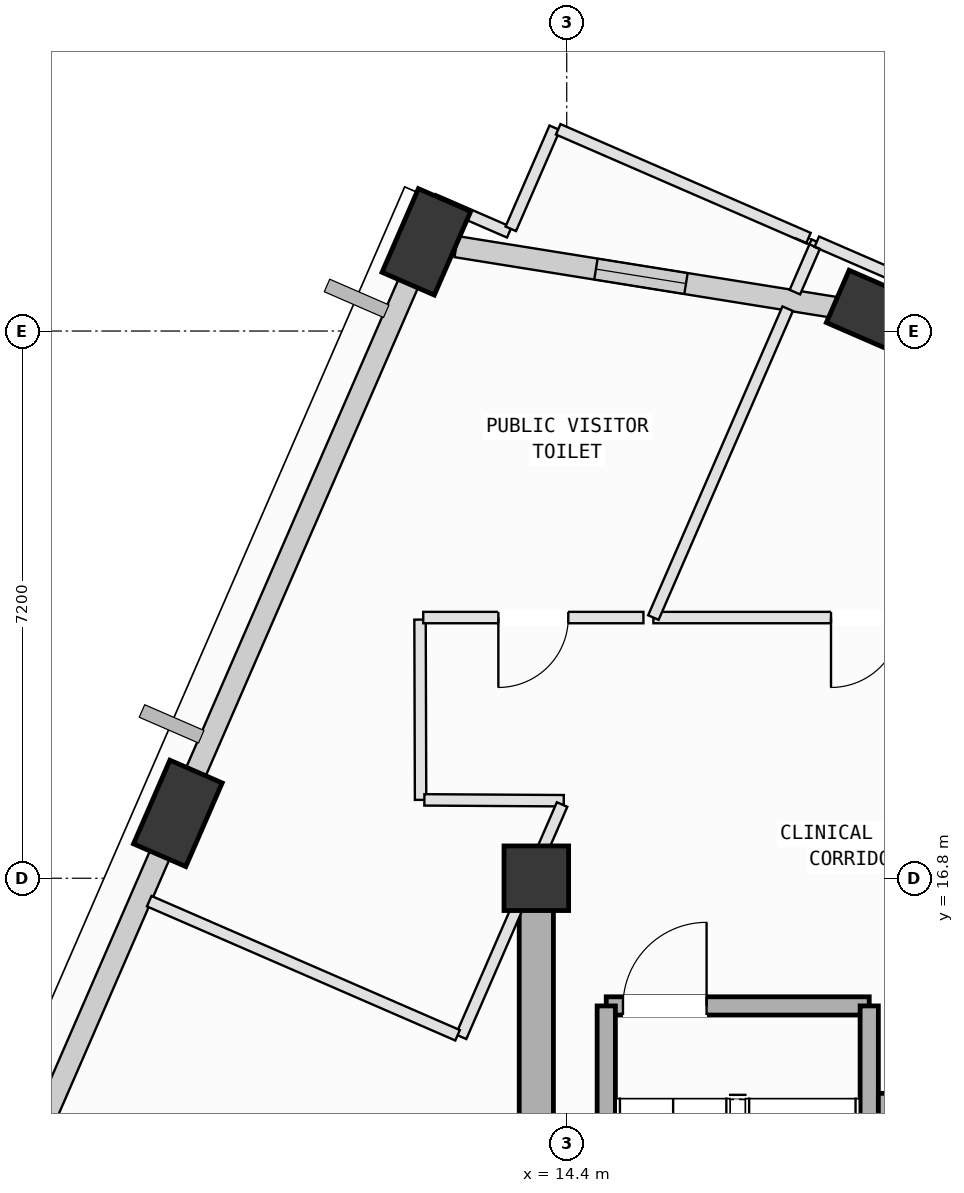
"""IFC4 building model, lengths in metres.
Left out: names, types, materials, properties, quantities, classifications, styles, units other than length and angle.
Written with IfcOpenShell. Run it as: python <this file> out.ifc"""

import sys

from ifc_helpers import new_model, si_unit, direction, frame, frame_2d, origin, origin_2d, place, context, subcontext, project, spatial, rectangle, extrude, element, fill, save


model = new_model("IFC4")
c1 = context("Model", 3, precision=1e-05, world=origin(), true_north=direction((0.0, 1.0)))
c2 = subcontext(c1, "Body", "Model", "MODEL_VIEW")
j1 = project(units=[si_unit("LENGTHUNIT", "METRE"), si_unit("PLANEANGLEUNIT", "RADIAN")], contexts=[c1])
p1 = place(None, origin())
s1 = spatial("IfcSite", under=j1, at=p1, CompositionType="ELEMENT")
p2 = place(p1, origin())
s2 = spatial("IfcBuilding", under=s1, at=p2, CompositionType="ELEMENT")
p3 = place(p2, frame((0.0, 0.0, 320.6)))
s3 = spatial("IfcBuildingStorey", under=s2, at=p3, CompositionType="ELEMENT", Elevation=320.6)
p4 = place(p3, frame((14.0, 16.8, 0.0), z_axis=(0.0, 0.0, 1.0), x_axis=(1.0, 0.0, 0.0)))
e1 = element("IfcColumn", 1, at=p4, inside=s3, PredefinedType="COLUMN", context=c2, shape_type="SweptSolid", body=[
    extrude(rectangle(XDim=0.85, YDim=0.85, at=origin_2d()), origin(), (0.0, 0.0, 1.0), 4.0),
])
for number, where, z_axis, x_axis in (
    (2, (18.516, 24.216, 0.002), (0.0, 0.0, 1.0), (-0.917, 0.399, 0.0)),
    (3, (12.553, 25.173, 0.002), (0.0, 0.0, 1.0), (0.399, 0.917, 0.0)),
    (4, (9.283, 17.654, 0.002), (0.0, 0.0, 1.0), (0.399, 0.917, 0.0)),
):
    element("IfcColumn", number, at=place(p3, frame(where, z_axis=z_axis, x_axis=x_axis)), inside=s3, PredefinedType="COLUMN", context=c2, shape_type="SweptSolid", body=[
        extrude(rectangle(XDim=1.2, YDim=0.75, at=origin_2d()), origin(), (0.0, 0.0, 1.0), 3.996),
    ])
p5 = place(p3, frame((12.946, 25.11, 0.0), z_axis=(0.0, 0.0, 1.0), x_axis=(0.987363821305, -0.158469821666, 0.0)))
e5 = element("IfcWall", 5, at=p5, inside=s3, PredefinedType="SOLIDWALL", context=c2, shape_type="SweptSolid", body=[
    extrude(rectangle(XDim=5.244, YDim=0.28, at=frame_2d((2.622, 0.0))), origin(), (0.0, 0.0, 1.0), 3.265),
])
p6 = place(p5, frame((1.862, 0.0, 0.75)))
e6 = element("IfcOpeningElement", 6, at=p6, cuts=e5, PredefinedType="OPENING", context=c2, shape_type="SweptSolid", body=[
    extrude(rectangle(XDim=1.2, YDim=1.75, at=frame_2d((0.6, 0.875))), frame((0.0, 0.15, 0.0), z_axis=(0.0, -1.0, 0.0), x_axis=(1.0, 0.0, 0.0)), (0.0, 0.0, 1.0), 0.3),
])
p7 = place(p3, frame((9.442, 18.018, 0.0), z_axis=(0.0, 0.0, 1.0), x_axis=(0.398768305896, 0.917051709672, 0.0)))
e7 = element("IfcWall", 7, at=p7, inside=s3, PredefinedType="SOLIDWALL", context=c2, shape_type="SweptSolid", body=[
    extrude(rectangle(XDim=7.405, YDim=0.28, at=frame_2d((3.703, 0.0))), origin(), (0.0, 0.0, 1.0), 3.265),
])
p8 = place(p3, frame((6.172, 10.498, 0.0), z_axis=(0.0, 0.0, 1.0), x_axis=(0.398740578379, 0.917063766133, 0.0)))
e8 = element("IfcWall", 8, at=p8, inside=s3, PredefinedType="SOLIDWALL", context=c2, shape_type="SweptSolid", body=[
    extrude(rectangle(XDim=7.405, YDim=0.28, at=frame_2d((3.702, 0.0))), origin(), (0.0, 0.0, 1.0), 3.265),
])
p9 = place(p3, frame((14.92, 15.12, 0.0), z_axis=(0.0, 0.0, 1.0), x_axis=(1.0, 0.0, 0.0)))
e9 = element("IfcWall", 9, at=p9, inside=s3, PredefinedType="SOLIDWALL", context=c2, shape_type="SweptSolid", body=[
    extrude(rectangle(XDim=3.46, YDim=0.24, at=frame_2d((1.73, 0.0))), origin(), (0.0, 0.0, 1.0), 3.78),
])
p10 = place(p9, frame((0.22, 0.0, 0.0)))
e10 = element("IfcOpeningElement", 10, at=p10, cuts=e9, PredefinedType="OPENING", context=c2, shape_type="SweptSolid", body=[
    extrude(rectangle(XDim=1.1, YDim=2.15, at=frame_2d((0.55, 1.075))), frame((0.0, 0.13, 0.0), z_axis=(0.0, -1.0, 0.0), x_axis=(1.0, 0.0, 0.0)), (0.0, 0.0, 1.0), 0.26),
])
for number, where, z_axis, x_axis in (
    (11, (18.38, 15.12, 0.0), (0.0, 0.0, 1.0), (0.0, -1.0, 0.0)),
    (12, (14.92, 8.025, 0.0), (0.0, 0.0, 1.0), (0.0, 1.0, 0.0)),
):
    element("IfcWall", number, at=place(p3, frame(where, z_axis=z_axis, x_axis=x_axis)), inside=s3, PredefinedType="SOLIDWALL", context=c2, shape_type="SweptSolid", body=[
        extrude(rectangle(XDim=7.095, YDim=0.24, at=frame_2d((3.548, 0.0))), origin(), (0.0, 0.0, 1.0), 3.78),
    ])
p11 = place(p3, frame((14.0, 16.8, 0.0), z_axis=(0.0, 0.0, 1.0), x_axis=(0.0, -1.0, 0.0)))
e13 = element("IfcWall", 13, at=p11, inside=s3, PredefinedType="SHEAR", context=c2, shape_type="SweptSolid", body=[
    extrude(rectangle(XDim=9.0, YDim=0.45, at=frame_2d((4.5, 0.0))), origin(), (0.0, 0.0, 1.0), 3.78),
])
p12 = place(p3, frame((18.5, 13.82, 0.0), z_axis=(0.0, 0.0, 1.0), x_axis=(1.0, 0.0, 0.0)))
e14 = element("IfcWall", 14, at=p12, inside=s3, PredefinedType="SOLIDWALL", context=c2, shape_type="SweptSolid", body=[
    extrude(rectangle(XDim=5.3, YDim=0.3, at=frame_2d((2.65, 0.0))), origin(), (0.0, 0.0, 1.0), 3.78),
])
p13 = place(p12, frame((0.18, 0.0, 0.0)))
e15 = element("IfcOpeningElement", 15, at=p13, cuts=e14, PredefinedType="OPENING", context=c2, shape_type="SweptSolid", body=[
    extrude(rectangle(XDim=1.1, YDim=2.15, at=frame_2d((0.55, 1.075))), frame((0.0, 0.16, 0.0), z_axis=(0.0, -1.0, 0.0), x_axis=(1.0, 0.0, 0.0)), (0.0, 0.0, 1.0), 0.32),
])
p14 = place(p3, frame((21.134, 20.23, 0.0), z_axis=(0.0, 0.0, 1.0), x_axis=(-1.0, 0.0, 0.0)))
e16 = element("IfcWall", 16, at=p14, inside=s3, PredefinedType="PARTITIONING", context=c2, shape_type="SweptSolid", body=[
    extrude(rectangle(XDim=5.594, YDim=0.15, at=frame_2d((2.797, 0.0))), origin(), (0.0, 0.0, 1.0), 3.415),
])
p15 = place(p14, frame((2.337, 0.0, 0.0)))
e17 = element("IfcOpeningElement", 17, at=p15, cuts=e16, PredefinedType="OPENING", context=c2, shape_type="SweptSolid", body=[
    extrude(rectangle(XDim=0.92, YDim=2.1, at=frame_2d((0.46, 1.05))), frame((0.0, 0.085, 0.0), z_axis=(0.0, -1.0, 0.0), x_axis=(1.0, 0.0, 0.0)), (0.0, 0.0, 1.0), 0.17),
])
p16 = place(p3, frame((15.54, 20.23, 0.0), z_axis=(0.0, 0.0, 1.0), x_axis=(0.398707980575, 0.917077939014, 0.0)))
e18 = element("IfcWall", 18, at=p16, inside=s3, PredefinedType="PARTITIONING", context=c2, shape_type="SweptSolid", body=[
    extrude(rectangle(XDim=4.431, YDim=0.15, at=frame_2d((2.216, 0.0))), origin(), (0.0, 0.0, 1.0), 2.765),
])
p17 = place(p3, frame((17.402, 24.512, 0.0), z_axis=(0.0, 0.0, 1.0), x_axis=(0.398195004061, 0.917300789677, 0.0)))
e19 = element("IfcWall", 19, at=p17, inside=s3, PredefinedType="PARTITIONING", context=c2, shape_type="SweptSolid", body=[
    extrude(rectangle(XDim=0.723, YDim=0.15, at=frame_2d((0.361, 0.0))), origin(), (0.0, 0.0, 1.0), 3.78),
])
p18 = place(p3, frame((17.69, 25.175, 0.0), z_axis=(0.0, 0.0, 1.0), x_axis=(0.917107123666, -0.398640845525, 0.0)))
e20 = element("IfcWall", 20, at=p18, inside=s3, PredefinedType="PARTITIONING", context=c2, shape_type="SweptSolid", body=[
    extrude(rectangle(XDim=5.13, YDim=0.15, at=frame_2d((2.565, 0.0))), origin(), (0.0, 0.0, 1.0), 3.78),
])
p19 = place(p3, frame((12.47, 20.203, 0.0), z_axis=(0.0, 0.0, 1.0), x_axis=(0.002985061327, -0.999995544695, 0.0)))
e21 = element("IfcWall", 21, at=p19, inside=s3, PredefinedType="PARTITIONING", context=c2, shape_type="SweptSolid", body=[
    extrude(rectangle(XDim=2.372, YDim=0.15, at=frame_2d((1.186, 0.0))), origin(), (0.0, 0.0, 1.0), 3.78),
])
p20 = place(p3, frame((12.527, 17.831, 0.0), z_axis=(0.0, 0.0, 1.0), x_axis=(0.999982057945, -0.005990307855, 0.0)))
e22 = element("IfcWall", 22, at=p20, inside=s3, PredefinedType="PARTITIONING", context=c2, shape_type="SweptSolid", body=[
    extrude(rectangle(XDim=1.834, YDim=0.15, at=frame_2d((0.917, 0.0))), origin(), (0.0, 0.0, 1.0), 3.78),
])
p21 = place(p3, frame((14.339, 17.77, 0.0), z_axis=(0.0, 0.0, 1.0), x_axis=(-0.399140640041, -0.916889714997, 0.0)))
e23 = element("IfcWall", 23, at=p21, inside=s3, PredefinedType="PARTITIONING", context=c2, shape_type="SweptSolid", body=[
    extrude(rectangle(XDim=0.84, YDim=0.15, at=frame_2d((0.42, 0.0))), origin(), (0.0, 0.0, 1.0), 2.765),
])
p22 = place(p3, frame((13.8, 16.53, 0.0), z_axis=(0.0, 0.0, 1.0), x_axis=(-0.398942481852, -0.916975951797, 0.0)))
e24 = element("IfcWall", 24, at=p22, inside=s3, PredefinedType="PARTITIONING", context=c2, shape_type="SweptSolid", body=[
    extrude(rectangle(XDim=1.98, YDim=0.15, at=frame_2d((0.99, 0.0))), origin(), (0.0, 0.0, 1.0), 2.765),
])
p23 = place(p3, frame((12.964, 14.734, 0.0), z_axis=(0.0, 0.0, 1.0), x_axis=(-0.917054263497, 0.398762432786, 0.0)))
e25 = element("IfcWall", 25, at=p23, inside=s3, PredefinedType="PARTITIONING", context=c2, shape_type="SweptSolid", body=[
    extrude(rectangle(XDim=4.424, YDim=0.15, at=frame_2d((2.212, 0.0))), origin(), (0.0, 0.0, 1.0), 3.78),
])
p24 = place(p3, frame((8.951, 17.365, 0.0), z_axis=(0.0, 0.0, 1.0), x_axis=(0.398916999953, 0.916987037612, 0.0)))
e26 = element("IfcWall", 26, at=p24, inside=s3, PredefinedType="PARTITIONING", context=c2, shape_type="SweptSolid", body=[
    extrude(rectangle(XDim=0.795, YDim=0.15, at=frame_2d((0.397, 0.0))), origin(), (0.0, 0.0, 1.0), 3.265),
])
p25 = place(p3, frame((12.22, 24.885, 0.0), z_axis=(0.0, 0.0, 1.0), x_axis=(0.399235297463, 0.916848502894, 0.0)))
e27 = element("IfcWall", 27, at=p25, inside=s3, PredefinedType="PARTITIONING", context=c2, shape_type="SweptSolid", body=[
    extrude(rectangle(XDim=0.947, YDim=0.15, at=frame_2d((0.473, 0.0))), origin(), (0.0, 0.0, 1.0), 3.265),
])
p26 = place(p3, frame((12.644, 25.733, 0.0), z_axis=(0.0, 0.0, 1.0), x_axis=(0.9173866736, -0.397997099362, 0.0)))
e28 = element("IfcWall", 28, at=p26, inside=s3, PredefinedType="PARTITIONING", context=c2, shape_type="SweptSolid", body=[
    extrude(rectangle(XDim=1.09, YDim=0.15, at=frame_2d((0.545, 0.0))), origin(), (0.0, 0.0, 1.0), 3.265),
])
p27 = place(p3, frame((13.664, 25.345, 0.0), z_axis=(0.0, 0.0, 1.0), x_axis=(0.398732271116, 0.917067378097, 0.0)))
e29 = element("IfcWall", 29, at=p27, inside=s3, PredefinedType="PARTITIONING", context=c2, shape_type="SweptSolid", body=[
    extrude(rectangle(XDim=1.449, YDim=0.15, at=frame_2d((0.725, 0.0))), origin(), (0.0, 0.0, 1.0), 3.78),
])
p28 = place(p3, frame((14.288, 26.654, 0.0), z_axis=(0.0, 0.0, 1.0), x_axis=(0.917085193586, -0.398691293741, 0.0)))
e30 = element("IfcWall", 30, at=p28, inside=s3, PredefinedType="PARTITIONING", context=c2, shape_type="SweptSolid", body=[
    extrude(rectangle(XDim=3.59, YDim=0.15, at=frame_2d((1.795, 0.0))), origin(), (0.0, 0.0, 1.0), 3.78),
])
p29 = place(p3, frame((15.409, 20.23, 0.0), z_axis=(0.0, 0.0, 1.0), x_axis=(-1.0, 0.0, 0.0)))
e31 = element("IfcWall", 31, at=p29, inside=s3, PredefinedType="PARTITIONING", context=c2, shape_type="SweptSolid", body=[
    extrude(rectangle(XDim=2.897, YDim=0.15, at=frame_2d((1.448, 0.0))), origin(), (0.0, 0.0, 1.0), 3.415),
])
p30 = place(p29, frame((0.989, 0.0, 0.0)))
e32 = element("IfcOpeningElement", 32, at=p30, cuts=e31, PredefinedType="OPENING", context=c2, shape_type="SweptSolid", body=[
    extrude(rectangle(XDim=0.92, YDim=2.1, at=frame_2d((0.46, 1.05))), frame((0.0, 0.085, 0.0), z_axis=(0.0, -1.0, 0.0), x_axis=(1.0, 0.0, 0.0)), (0.0, 0.0, 1.0), 0.17),
])
p31 = place(p6, origin())
e33 = element("IfcWindow", 33, at=p31, inside=s3, PartitioningType="SINGLE_PANEL", PredefinedType="WINDOW", context=c2, shape_type="SweptSolid", body=[
    extrude(rectangle(XDim=1.2, YDim=1.75, at=frame_2d((0.6, 0.875))), frame((0.0, 0.03, 0.0), z_axis=(0.0, -1.0, 0.0), x_axis=(1.0, 0.0, 0.0)), (0.0, 0.0, 1.0), 0.06),
])
fill(e6, e33)
p32 = place(p10, origin())
e34 = element("IfcDoor", 34, at=p32, inside=s3, OperationType="SINGLE_SWING_RIGHT", PredefinedType="DOOR", context=c2, shape_type="SweptSolid", body=[
    extrude(rectangle(XDim=1.1, YDim=2.15, at=frame_2d((0.55, 1.075))), frame((0.0, 0.025, 0.0), z_axis=(0.0, -1.0, 0.0), x_axis=(1.0, 0.0, 0.0)), (0.0, 0.0, 1.0), 0.05),
])
fill(e10, e34)
p33 = place(p15, origin())
e35 = element("IfcDoor", 35, at=p33, inside=s3, OperationType="SINGLE_SWING_RIGHT", PredefinedType="DOOR", context=c2, shape_type="SweptSolid", body=[
    extrude(rectangle(XDim=0.92, YDim=2.1, at=frame_2d((0.46, 1.05))), frame((0.0, 0.025, 0.0), z_axis=(0.0, -1.0, 0.0), x_axis=(1.0, 0.0, 0.0)), (0.0, 0.0, 1.0), 0.05),
])
fill(e17, e35)
p34 = place(p30, origin())
e36 = element("IfcDoor", 36, at=p34, inside=s3, OperationType="SINGLE_SWING_RIGHT", PredefinedType="DOOR", context=c2, shape_type="SweptSolid", body=[
    extrude(rectangle(XDim=0.92, YDim=2.1, at=frame_2d((0.46, 1.05))), frame((0.0, 0.025, 0.0), z_axis=(0.0, -1.0, 0.0), x_axis=(1.0, 0.0, 0.0)), (0.0, 0.0, 1.0), 0.05),
])
fill(e32, e36)
save(model, sys.argv[1])
